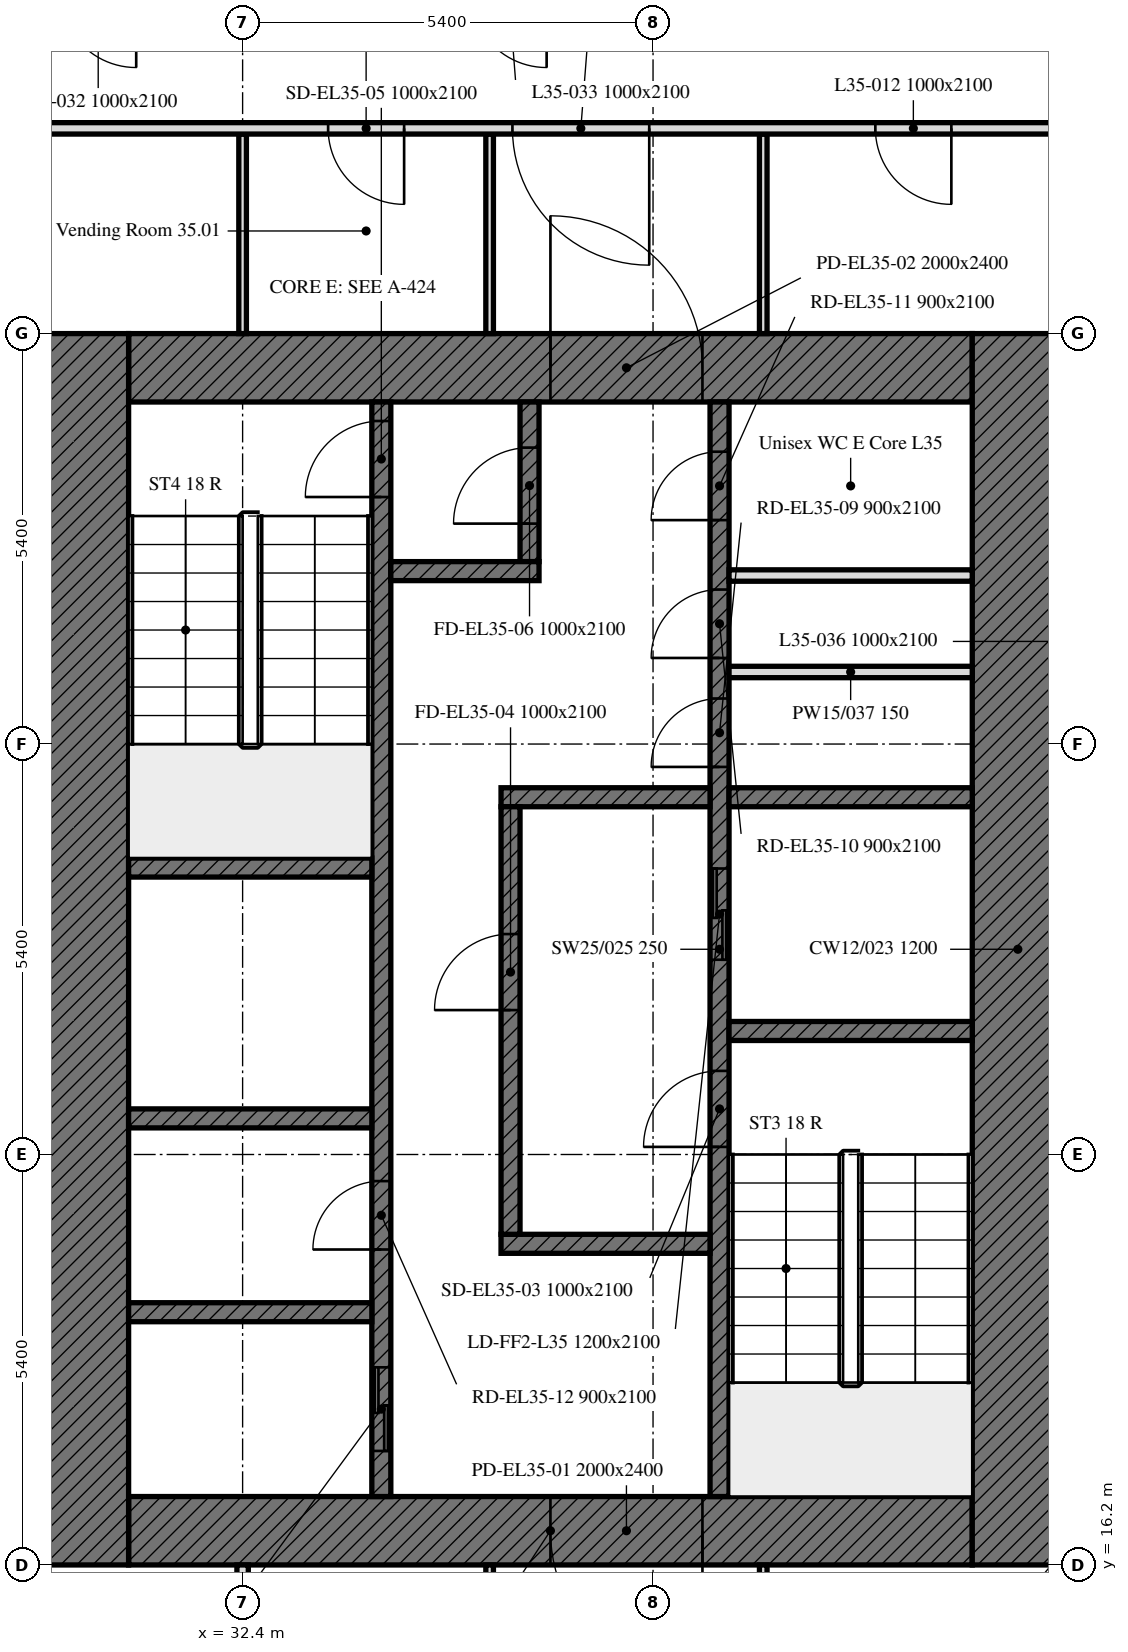
"""IFC4 building model, lengths in metres.
Left out: names, types, materials, properties, quantities, classifications, styles, units other than length and angle.
Written with IfcOpenShell. Run it as: python <this file> out.ifc"""

import sys

from ifc_helpers import new_model, si_unit, direction, frame, frame_2d, origin, place, context, subcontext, project, spatial, rectangle, extrude, element, fill, save


model = new_model("IFC4")
c1 = context("Model", 3, precision=1e-05, world=origin(), true_north=direction((0.0, 1.0)))
c2 = subcontext(c1, "Body", "Model", "MODEL_VIEW")
j1 = project(units=[si_unit("LENGTHUNIT", "METRE"), si_unit("PLANEANGLEUNIT", "RADIAN")], contexts=[c1])
p1 = place(None, origin())
s1 = spatial("IfcSite", under=j1, at=p1, CompositionType="ELEMENT")
p2 = place(p1, origin())
s2 = spatial("IfcBuilding", under=s1, at=p2, CompositionType="ELEMENT")
p3 = place(p2, frame((0.0, 0.0, 152.8)))
s3 = spatial("IfcBuildingStorey", under=s2, at=p3, CompositionType="ELEMENT", Elevation=152.8)
p4 = place(p3, frame((42.0, 16.65, 0.0), z_axis=(0.0, 0.0, 1.0), x_axis=(-1.0, 0.0, 0.0)))
e1 = element("IfcWall", 1, at=p4, inside=s3, PredefinedType="SOLIDWALL", context=c2, shape_type="SweptSolid", body=[
    extrude(rectangle(XDim=11.1, YDim=0.9, at=frame_2d((5.55, 0.0))), origin(), (0.0, 0.0, 1.0), 3.0),
])
p5 = place(p4, frame((3.55, 0.0, 0.0)))
e2 = element("IfcOpeningElement", 2, at=p5, cuts=e1, PredefinedType="OPENING", context=c2, shape_type="SweptSolid", body=[
    extrude(rectangle(XDim=2.0, YDim=2.4, at=frame_2d((1.0, 1.2))), frame((0.0, 0.45, 0.0), z_axis=(0.0, -1.0, 0.0), x_axis=(1.0, 0.0, 0.0)), (0.0, 0.0, 1.0), 0.9),
])
p6 = place(p3, frame((30.9, 31.95, 0.0), z_axis=(0.0, 0.0, 1.0), x_axis=(1.0, 0.0, 0.0)))
e3 = element("IfcWall", 3, at=p6, inside=s3, PredefinedType="SOLIDWALL", context=c2, shape_type="SweptSolid", body=[
    extrude(rectangle(XDim=11.1, YDim=0.9, at=frame_2d((5.55, 0.0))), origin(), (0.0, 0.0, 1.0), 3.0),
])
p7 = place(p6, frame((5.55, 0.0, 0.0)))
e4 = element("IfcOpeningElement", 4, at=p7, cuts=e3, PredefinedType="OPENING", context=c2, shape_type="SweptSolid", body=[
    extrude(rectangle(XDim=2.0, YDim=2.4, at=frame_2d((1.0, 1.2))), frame((0.0, 0.45, 0.0), z_axis=(0.0, -1.0, 0.0), x_axis=(1.0, 0.0, 0.0)), (0.0, 0.0, 1.0), 0.9),
])
for number, where, z_axis, x_axis in (
    (5, (42.6, 32.4, 0.0), (0.0, 0.0, 1.0), (0.0, -1.0, 0.0)),
    (6, (30.3, 16.2, 0.0), (0.0, 0.0, 1.0), (0.0, 1.0, 0.0)),
):
    element("IfcWall", number, at=place(p3, frame(where, z_axis=z_axis, x_axis=x_axis)), inside=s3, PredefinedType="SOLIDWALL", context=c2, shape_type="SweptSolid", body=[
        extrude(rectangle(XDim=16.2, YDim=1.2, at=frame_2d((8.1, 0.0))), origin(), (0.0, 0.0, 1.0), 3.0),
    ])
p8 = place(p3, frame((38.675, 17.1, 0.0), z_axis=(0.0, 0.0, 1.0), x_axis=(0.0, 1.0, 0.0)))
e7 = element("IfcWall", 7, at=p8, inside=s3, PredefinedType="SOLIDWALL", context=c2, shape_type="SweptSolid", body=[
    extrude(rectangle(XDim=14.4, YDim=0.25, at=frame_2d((7.2, 0.0))), origin(), (0.0, 0.0, 1.0), 3.0),
])
p9 = place(p8, frame((4.6, 0.0, 0.0)))
e8 = element("IfcOpeningElement", 8, at=p9, cuts=e7, PredefinedType="OPENING", context=c2, shape_type="SweptSolid", body=[
    extrude(rectangle(XDim=1.0, YDim=2.1, at=frame_2d((0.5, 1.05))), frame((0.0, 0.125, 0.0), z_axis=(0.0, -1.0, 0.0), x_axis=(1.0, 0.0, 0.0)), (0.0, 0.0, 1.0), 0.25),
])
p10 = place(p8, frame((7.062, 0.0, 0.0)))
e9 = element("IfcOpeningElement", 9, at=p10, cuts=e7, PredefinedType="OPENING", context=c2, shape_type="SweptSolid", body=[
    extrude(rectangle(XDim=1.2, YDim=2.1, at=frame_2d((0.6, 1.05))), frame((0.0, 0.125, 0.0), z_axis=(0.0, -1.0, 0.0), x_axis=(1.0, 0.0, 0.0)), (0.0, 0.0, 1.0), 0.25),
])
p11 = place(p8, frame((9.599, 0.0, 0.0)))
e10 = element("IfcOpeningElement", 10, at=p11, cuts=e7, PredefinedType="OPENING", context=c2, shape_type="SweptSolid", body=[
    extrude(rectangle(XDim=0.9, YDim=2.1, at=frame_2d((0.45, 1.05))), frame((0.0, 0.125, 0.0), z_axis=(0.0, -1.0, 0.0), x_axis=(1.0, 0.0, 0.0)), (0.0, 0.0, 1.0), 0.25),
])
p12 = place(p8, frame((11.032, 0.0, 0.0)))
e11 = element("IfcOpeningElement", 11, at=p12, cuts=e7, PredefinedType="OPENING", context=c2, shape_type="SweptSolid", body=[
    extrude(rectangle(XDim=0.9, YDim=2.1, at=frame_2d((0.45, 1.05))), frame((0.0, 0.125, 0.0), z_axis=(0.0, -1.0, 0.0), x_axis=(1.0, 0.0, 0.0)), (0.0, 0.0, 1.0), 0.25),
])
p13 = place(p8, frame((12.846, 0.0, 0.0)))
e12 = element("IfcOpeningElement", 12, at=p13, cuts=e7, PredefinedType="OPENING", context=c2, shape_type="SweptSolid", body=[
    extrude(rectangle(XDim=0.9, YDim=2.1, at=frame_2d((0.45, 1.05))), frame((0.0, 0.125, 0.0), z_axis=(0.0, -1.0, 0.0), x_axis=(1.0, 0.0, 0.0)), (0.0, 0.0, 1.0), 0.25),
])
p14 = place(p3, frame((34.225, 17.1, 0.0), z_axis=(0.0, 0.0, 1.0), x_axis=(0.0, 1.0, 0.0)))
e13 = element("IfcWall", 13, at=p14, inside=s3, PredefinedType="SOLIDWALL", context=c2, shape_type="SweptSolid", body=[
    extrude(rectangle(XDim=14.4, YDim=0.25, at=frame_2d((7.2, 0.0))), origin(), (0.0, 0.0, 1.0), 3.0),
])
p15 = place(p14, frame((13.15, 0.0, 0.0)))
e14 = element("IfcOpeningElement", 14, at=p15, cuts=e13, PredefinedType="OPENING", context=c2, shape_type="SweptSolid", body=[
    extrude(rectangle(XDim=1.0, YDim=2.1, at=frame_2d((0.5, 1.05))), frame((0.0, 0.125, 0.0), z_axis=(0.0, -1.0, 0.0), x_axis=(1.0, 0.0, 0.0)), (0.0, 0.0, 1.0), 0.25),
])
p16 = place(p14, frame((0.6, 0.0, 0.0)))
e15 = element("IfcOpeningElement", 15, at=p16, cuts=e13, PredefinedType="OPENING", context=c2, shape_type="SweptSolid", body=[
    extrude(rectangle(XDim=1.1, YDim=2.1, at=frame_2d((0.55, 1.05))), frame((0.0, 0.125, 0.0), z_axis=(0.0, -1.0, 0.0), x_axis=(1.0, 0.0, 0.0)), (0.0, 0.0, 1.0), 0.25),
])
p17 = place(p14, frame((3.25, 0.0, 0.0)))
e16 = element("IfcOpeningElement", 16, at=p17, cuts=e13, PredefinedType="OPENING", context=c2, shape_type="SweptSolid", body=[
    extrude(rectangle(XDim=0.9, YDim=2.1, at=frame_2d((0.45, 1.05))), frame((0.0, 0.125, 0.0), z_axis=(0.0, -1.0, 0.0), x_axis=(1.0, 0.0, 0.0)), (0.0, 0.0, 1.0), 0.25),
])
p18 = place(p3, frame((38.8, 23.225, 0.0), z_axis=(0.0, 0.0, 1.0), x_axis=(1.0, 0.0, 0.0)))
e17 = element("IfcWall", 17, at=p18, inside=s3, PredefinedType="SOLIDWALL", context=c2, shape_type="SweptSolid", body=[
    extrude(rectangle(XDim=3.2, YDim=0.25, at=frame_2d((1.6, 0.0))), origin(), (0.0, 0.0, 1.0), 3.0),
])
for number, where, z_axis, x_axis in (
    (18, (30.9, 25.375, 0.0), (0.0, 0.0, 1.0), (1.0, 0.0, 0.0)),
    (19, (30.9, 22.075, 0.0), (0.0, 0.0, 1.0), (1.0, 0.0, 0.0)),
):
    element("IfcWall", number, at=place(p3, frame(where, z_axis=z_axis, x_axis=x_axis)), inside=s3, PredefinedType="SOLIDWALL", context=c2, shape_type="SweptSolid", body=[
        extrude(rectangle(XDim=3.2, YDim=0.25, at=frame_2d((1.6, 0.0))), origin(), (0.0, 0.0, 1.0), 3.0),
    ])
p19 = place(p3, frame((38.8, 26.3, 0.0), z_axis=(0.0, 0.0, 1.0), x_axis=(1.0, 0.0, 0.0)))
e20 = element("IfcWall", 20, at=p19, inside=s3, PredefinedType="SOLIDWALL", context=c2, shape_type="SweptSolid", body=[
    extrude(rectangle(XDim=3.2, YDim=0.25, at=frame_2d((1.6, 0.0))), origin(), (0.0, 0.0, 1.0), 3.0),
])
for number, where, z_axis, x_axis in (
    (21, (35.8, 26.3, 0.0), (0.0, 0.0, 1.0), (1.0, 0.0, 0.0)),
    (22, (35.8, 20.425, 0.0), (0.0, 0.0, 1.0), (1.0, 0.0, 0.0)),
):
    element("IfcWall", number, at=place(p3, frame(where, z_axis=z_axis, x_axis=x_axis)), inside=s3, PredefinedType="SOLIDWALL", context=c2, shape_type="SweptSolid", body=[
        extrude(rectangle(XDim=2.75, YDim=0.25, at=frame_2d((1.375, 0.0))), origin(), (0.0, 0.0, 1.0), 3.0),
    ])
p20 = place(p3, frame((36.175, 29.4, 0.0), z_axis=(0.0, 0.0, 1.0), x_axis=(0.0, 1.0, 0.0)))
e23 = element("IfcWall", 23, at=p20, inside=s3, PredefinedType="SOLIDWALL", context=c2, shape_type="SweptSolid", body=[
    extrude(rectangle(XDim=2.1, YDim=0.25, at=frame_2d((1.05, 0.0))), origin(), (0.0, 0.0, 1.0), 3.0),
])
p21 = place(p20, frame((0.5, 0.0, 0.0)))
e24 = element("IfcOpeningElement", 24, at=p21, cuts=e23, PredefinedType="OPENING", context=c2, shape_type="SweptSolid", body=[
    extrude(rectangle(XDim=1.0, YDim=2.1, at=frame_2d((0.5, 1.05))), frame((0.0, 0.125, 0.0), z_axis=(0.0, -1.0, 0.0), x_axis=(1.0, 0.0, 0.0)), (0.0, 0.0, 1.0), 0.25),
])
p22 = place(p3, frame((34.35, 29.275, 0.0), z_axis=(0.0, 0.0, 1.0), x_axis=(1.0, 0.0, 0.0)))
e25 = element("IfcWall", 25, at=p22, inside=s3, PredefinedType="SOLIDWALL", context=c2, shape_type="SweptSolid", body=[
    extrude(rectangle(XDim=1.95, YDim=0.25, at=frame_2d((0.975, 0.0))), origin(), (0.0, 0.0, 1.0), 3.0),
])
p23 = place(p3, frame((35.925, 20.55, 0.0), z_axis=(0.0, 0.0, 1.0), x_axis=(0.0, 1.0, 0.0)))
e26 = element("IfcWall", 26, at=p23, inside=s3, PredefinedType="SOLIDWALL", context=c2, shape_type="SweptSolid", body=[
    extrude(rectangle(XDim=5.625, YDim=0.25, at=frame_2d((2.812, 0.0))), origin(), (0.0, 0.0, 1.0), 3.0),
])
p24 = place(p23, frame((2.95, 0.0, 0.0)))
e27 = element("IfcOpeningElement", 27, at=p24, cuts=e26, PredefinedType="OPENING", context=c2, shape_type="SweptSolid", body=[
    extrude(rectangle(XDim=1.0, YDim=2.1, at=frame_2d((0.5, 1.05))), frame((0.0, 0.125, 0.0), z_axis=(0.0, -1.0, 0.0), x_axis=(1.0, 0.0, 0.0)), (0.0, 0.0, 1.0), 0.25),
])
p25 = place(p3, frame((30.9, 19.525, 0.0), z_axis=(0.0, 0.0, 1.0), x_axis=(1.0, 0.0, 0.0)))
e28 = element("IfcWall", 28, at=p25, inside=s3, PredefinedType="SOLIDWALL", context=c2, shape_type="SweptSolid", body=[
    extrude(rectangle(XDim=3.2, YDim=0.25, at=frame_2d((1.6, 0.0))), origin(), (0.0, 0.0, 1.0), 3.0),
])
for number, where, z_axis, x_axis in (
    (29, (38.8, 27.948, 0.0), (0.0, 0.0, 1.0), (1.0, 0.0, 0.0)),
    (30, (38.8, 29.217, 0.0), (0.0, 0.0, 1.0), (1.0, 0.0, 0.0)),
):
    element("IfcWall", number, at=place(p3, frame(where, z_axis=z_axis, x_axis=x_axis)), inside=s3, PredefinedType="PARTITIONING", context=c2, shape_type="SweptSolid", body=[
        extrude(rectangle(XDim=3.2, YDim=0.15, at=frame_2d((1.6, 0.0))), origin(), (0.0, 0.0, 1.0), 3.0),
    ])
for number, where, z_axis, x_axis in (
    (31, (32.4, 32.4, 0.0), (0.0, 0.0, 1.0), (0.0, 1.0, 0.0)),
    (32, (39.25, 32.4, 0.0), (0.0, 0.0, 1.0), (0.0, 1.0, 0.0)),
    (33, (35.65, 35.025, 0.0), (0.0, 0.0, 1.0), (0.0, -1.0, 0.0)),
):
    element("IfcWall", number, at=place(p3, frame(where, z_axis=z_axis, x_axis=x_axis)), inside=s3, PredefinedType="PARTITIONING", context=c2, shape_type="SweptSolid", body=[
        extrude(rectangle(XDim=2.625, YDim=0.1, at=frame_2d((1.312, 0.0))), origin(), (0.0, 0.0, 1.0), 3.0),
    ])
p26 = place(p3, frame((43.275, 35.1, 0.0), z_axis=(0.0, 0.0, 1.0), x_axis=(-1.0, 0.0, 0.0)))
e34 = element("IfcWall", 34, at=p26, inside=s3, PredefinedType="PARTITIONING", context=c2, shape_type="SweptSolid", body=[
    extrude(rectangle(XDim=37.124, YDim=0.15, at=frame_2d((18.562, 0.0))), origin(), (0.0, 0.0, 1.0), 3.0),
])
p27 = place(p26, frame((18.475, 0.0, 0.0)))
e35 = element("IfcOpeningElement", 35, at=p27, cuts=e34, PredefinedType="OPENING", context=c2, shape_type="SweptSolid", body=[
    extrude(rectangle(XDim=1.0, YDim=2.1, at=frame_2d((0.5, 1.05))), frame((0.0, 0.075, 0.0), z_axis=(0.0, -1.0, 0.0), x_axis=(1.0, 0.0, 0.0)), (0.0, 0.0, 1.0), 0.15),
])
p28 = place(p26, frame((34.095, 0.0, 0.0)))
e36 = element("IfcOpeningElement", 36, at=p28, cuts=e34, PredefinedType="OPENING", context=c2, shape_type="SweptSolid", body=[
    extrude(rectangle(XDim=1.0, YDim=2.1, at=frame_2d((0.5, 1.05))), frame((0.0, 0.075, 0.0), z_axis=(0.0, -1.0, 0.0), x_axis=(1.0, 0.0, 0.0)), (0.0, 0.0, 1.0), 0.15),
])
p29 = place(p26, frame((8.75, 0.0, 0.0)))
e37 = element("IfcOpeningElement", 37, at=p29, cuts=e34, PredefinedType="OPENING", context=c2, shape_type="SweptSolid", body=[
    extrude(rectangle(XDim=1.0, YDim=2.1, at=frame_2d((0.5, 1.05))), frame((0.0, 0.075, 0.0), z_axis=(0.0, -1.0, 0.0), x_axis=(1.0, 0.0, 0.0)), (0.0, 0.0, 1.0), 0.15),
])
p30 = place(p26, frame((1.55, 0.0, 0.0)))
e38 = element("IfcOpeningElement", 38, at=p30, cuts=e34, PredefinedType="OPENING", context=c2, shape_type="SweptSolid", body=[
    extrude(rectangle(XDim=1.0, YDim=2.1, at=frame_2d((0.5, 1.05))), frame((0.0, 0.075, 0.0), z_axis=(0.0, -1.0, 0.0), x_axis=(1.0, 0.0, 0.0)), (0.0, 0.0, 1.0), 0.15),
])
p31 = place(p26, frame((28.2, 0.0, 0.0)))
e39 = element("IfcOpeningElement", 39, at=p31, cuts=e34, PredefinedType="OPENING", context=c2, shape_type="SweptSolid", body=[
    extrude(rectangle(XDim=1.0, YDim=2.1, at=frame_2d((0.5, 1.05))), frame((0.0, 0.075, 0.0), z_axis=(0.0, -1.0, 0.0), x_axis=(1.0, 0.0, 0.0)), (0.0, 0.0, 1.0), 0.15),
])
p32 = place(p26, frame((30.625, 0.0, 0.0)))
e40 = element("IfcOpeningElement", 40, at=p32, cuts=e34, PredefinedType="OPENING", context=c2, shape_type="SweptSolid", body=[
    extrude(rectangle(XDim=1.8, YDim=2.4, at=frame_2d((0.9, 1.2))), frame((0.0, 0.075, 0.0), z_axis=(0.0, -1.0, 0.0), x_axis=(1.0, 0.0, 0.0)), (0.0, 0.0, 1.0), 0.15),
])
p33 = place(p26, frame((5.525, 0.0, 0.0)))
e41 = element("IfcOpeningElement", 41, at=p33, cuts=e34, PredefinedType="OPENING", context=c2, shape_type="SweptSolid", body=[
    extrude(rectangle(XDim=1.8, YDim=2.4, at=frame_2d((0.9, 1.2))), frame((0.0, 0.075, 0.0), z_axis=(0.0, -1.0, 0.0), x_axis=(1.0, 0.0, 0.0)), (0.0, 0.0, 1.0), 0.15),
])
p34 = place(p3, frame((32.4, 11.245, 0.0), z_axis=(0.0, 0.0, 1.0), x_axis=(0.0, 1.0, 0.0)))
e42 = element("IfcWall", 42, at=p34, inside=s3, PredefinedType="PARTITIONING", context=c2, shape_type="SweptSolid", body=[
    extrude(rectangle(XDim=4.955, YDim=0.15, at=frame_2d((2.478, 0.0))), origin(), (0.0, 0.0, 1.0), 2.4),
])
for number, where, z_axis, x_axis in (
    (43, (35.65, 16.2, 0.0), (0.0, 0.0, 1.0), (0.0, -1.0, 0.0)),
    (44, (39.25, 9.075, 0.0), (0.0, 0.0, 1.0), (0.0, 1.0, 0.0)),
):
    element("IfcWall", number, at=place(p3, frame(where, z_axis=z_axis, x_axis=x_axis)), inside=s3, PredefinedType="PARTITIONING", context=c2, shape_type="SweptSolid", body=[
        extrude(rectangle(XDim=7.125, YDim=0.1, at=frame_2d((3.562, 0.0))), origin(), (0.0, 0.0, 1.0), 2.4),
    ])
p35 = place(p5, origin())
e45 = element("IfcDoor", 45, at=p35, inside=s3, OperationType="DOUBLE_DOOR_SINGLE_SWING", PredefinedType="DOOR", context=c2, shape_type="SweptSolid", body=[
    extrude(rectangle(XDim=2.0, YDim=2.4, at=frame_2d((1.0, 1.2))), frame((0.0, 0.025, 0.0), z_axis=(0.0, -1.0, 0.0), x_axis=(1.0, 0.0, 0.0)), (0.0, 0.0, 1.0), 0.05),
])
fill(e2, e45)
p36 = place(p7, origin())
e46 = element("IfcDoor", 46, at=p36, inside=s3, OperationType="DOUBLE_DOOR_SINGLE_SWING", PredefinedType="DOOR", context=c2, shape_type="SweptSolid", body=[
    extrude(rectangle(XDim=2.0, YDim=2.4, at=frame_2d((1.0, 1.2))), frame((0.0, 0.025, 0.0), z_axis=(0.0, -1.0, 0.0), x_axis=(1.0, 0.0, 0.0)), (0.0, 0.0, 1.0), 0.05),
])
fill(e4, e46)
p37 = place(p9, origin())
e47 = element("IfcDoor", 47, at=p37, inside=s3, OperationType="SINGLE_SWING_LEFT", PredefinedType="DOOR", context=c2, shape_type="SweptSolid", body=[
    extrude(rectangle(XDim=1.0, YDim=2.1, at=frame_2d((0.5, 1.05))), frame((0.0, 0.025, 0.0), z_axis=(0.0, -1.0, 0.0), x_axis=(1.0, 0.0, 0.0)), (0.0, 0.0, 1.0), 0.05),
])
fill(e8, e47)
p38 = place(p24, origin())
e48 = element("IfcDoor", 48, at=p38, inside=s3, OperationType="SINGLE_SWING_LEFT", PredefinedType="DOOR", context=c2, shape_type="SweptSolid", body=[
    extrude(rectangle(XDim=1.0, YDim=2.1, at=frame_2d((0.5, 1.05))), frame((0.0, 0.025, 0.0), z_axis=(0.0, -1.0, 0.0), x_axis=(1.0, 0.0, 0.0)), (0.0, 0.0, 1.0), 0.05),
])
fill(e27, e48)
p39 = place(p15, origin())
e49 = element("IfcDoor", 49, at=p39, inside=s3, OperationType="SINGLE_SWING_LEFT", PredefinedType="DOOR", context=c2, shape_type="SweptSolid", body=[
    extrude(rectangle(XDim=1.0, YDim=2.1, at=frame_2d((0.5, 1.05))), frame((0.0, 0.025, 0.0), z_axis=(0.0, -1.0, 0.0), x_axis=(1.0, 0.0, 0.0)), (0.0, 0.0, 1.0), 0.05),
])
fill(e14, e49)
p40 = place(p21, origin())
e50 = element("IfcDoor", 50, at=p40, inside=s3, OperationType="SINGLE_SWING_LEFT", PredefinedType="DOOR", context=c2, shape_type="SweptSolid", body=[
    extrude(rectangle(XDim=1.0, YDim=2.1, at=frame_2d((0.5, 1.05))), frame((0.0, 0.025, 0.0), z_axis=(0.0, -1.0, 0.0), x_axis=(1.0, 0.0, 0.0)), (0.0, 0.0, 1.0), 0.05),
])
fill(e24, e50)
p41 = place(p10, origin())
e51 = element("IfcDoor", 51, at=p41, inside=s3, OperationType="DOUBLE_DOOR_SLIDING", PredefinedType="DOOR", context=c2, shape_type="SweptSolid", body=[
    extrude(rectangle(XDim=1.2, YDim=2.1, at=frame_2d((0.6, 1.05))), frame((0.0, 0.025, 0.0), z_axis=(0.0, -1.0, 0.0), x_axis=(1.0, 0.0, 0.0)), (0.0, 0.0, 1.0), 0.05),
])
fill(e9, e51)
p42 = place(p16, origin())
e52 = element("IfcDoor", 52, at=p42, inside=s3, OperationType="DOUBLE_DOOR_SLIDING", PredefinedType="DOOR", context=c2, shape_type="SweptSolid", body=[
    extrude(rectangle(XDim=1.1, YDim=2.1, at=frame_2d((0.55, 1.05))), frame((0.0, 0.025, 0.0), z_axis=(0.0, -1.0, 0.0), x_axis=(1.0, 0.0, 0.0)), (0.0, 0.0, 1.0), 0.05),
])
fill(e15, e52)
p43 = place(p11, origin())
e53 = element("IfcDoor", 53, at=p43, inside=s3, OperationType="SINGLE_SWING_LEFT", PredefinedType="DOOR", context=c2, shape_type="SweptSolid", body=[
    extrude(rectangle(XDim=0.9, YDim=2.1, at=frame_2d((0.45, 1.05))), frame((0.0, 0.025, 0.0), z_axis=(0.0, -1.0, 0.0), x_axis=(1.0, 0.0, 0.0)), (0.0, 0.0, 1.0), 0.05),
])
fill(e10, e53)
p44 = place(p12, origin())
e54 = element("IfcDoor", 54, at=p44, inside=s3, OperationType="SINGLE_SWING_LEFT", PredefinedType="DOOR", context=c2, shape_type="SweptSolid", body=[
    extrude(rectangle(XDim=0.9, YDim=2.1, at=frame_2d((0.45, 1.05))), frame((0.0, 0.025, 0.0), z_axis=(0.0, -1.0, 0.0), x_axis=(1.0, 0.0, 0.0)), (0.0, 0.0, 1.0), 0.05),
])
fill(e11, e54)
p45 = place(p13, origin())
e55 = element("IfcDoor", 55, at=p45, inside=s3, OperationType="SINGLE_SWING_LEFT", PredefinedType="DOOR", context=c2, shape_type="SweptSolid", body=[
    extrude(rectangle(XDim=0.9, YDim=2.1, at=frame_2d((0.45, 1.05))), frame((0.0, 0.025, 0.0), z_axis=(0.0, -1.0, 0.0), x_axis=(1.0, 0.0, 0.0)), (0.0, 0.0, 1.0), 0.05),
])
fill(e12, e55)
p46 = place(p17, origin())
e56 = element("IfcDoor", 56, at=p46, inside=s3, OperationType="SINGLE_SWING_LEFT", PredefinedType="DOOR", context=c2, shape_type="SweptSolid", body=[
    extrude(rectangle(XDim=0.9, YDim=2.1, at=frame_2d((0.45, 1.05))), frame((0.0, 0.025, 0.0), z_axis=(0.0, -1.0, 0.0), x_axis=(1.0, 0.0, 0.0)), (0.0, 0.0, 1.0), 0.05),
])
fill(e16, e56)
p47 = place(p29, origin())
e57 = element("IfcDoor", 57, at=p47, inside=s3, OperationType="SINGLE_SWING_LEFT", PredefinedType="DOOR", context=c2, shape_type="SweptSolid", body=[
    extrude(rectangle(XDim=1.0, YDim=2.1, at=frame_2d((0.5, 1.05))), frame((0.0, 0.025, 0.0), z_axis=(0.0, -1.0, 0.0), x_axis=(1.0, 0.0, 0.0)), (0.0, 0.0, 1.0), 0.05),
])
fill(e37, e57)
p48 = place(p30, origin())
e58 = element("IfcDoor", 58, at=p48, inside=s3, OperationType="SINGLE_SWING_RIGHT", PredefinedType="DOOR", context=c2, shape_type="SweptSolid", body=[
    extrude(rectangle(XDim=1.0, YDim=2.1, at=frame_2d((0.5, 1.05))), frame((0.0, 0.025, 0.0), z_axis=(0.0, -1.0, 0.0), x_axis=(1.0, 0.0, 0.0)), (0.0, 0.0, 1.0), 0.05),
])
fill(e38, e58)
p49 = place(p33, origin())
e59 = element("IfcDoor", 59, at=p49, inside=s3, OperationType="DOUBLE_DOOR_SINGLE_SWING", PredefinedType="DOOR", context=c2, shape_type="SweptSolid", body=[
    extrude(rectangle(XDim=1.8, YDim=2.4, at=frame_2d((0.9, 1.2))), frame((0.0, 0.025, 0.0), z_axis=(0.0, -1.0, 0.0), x_axis=(1.0, 0.0, 0.0)), (0.0, 0.0, 1.0), 0.05),
])
fill(e41, e59)
save(model, sys.argv[1])
